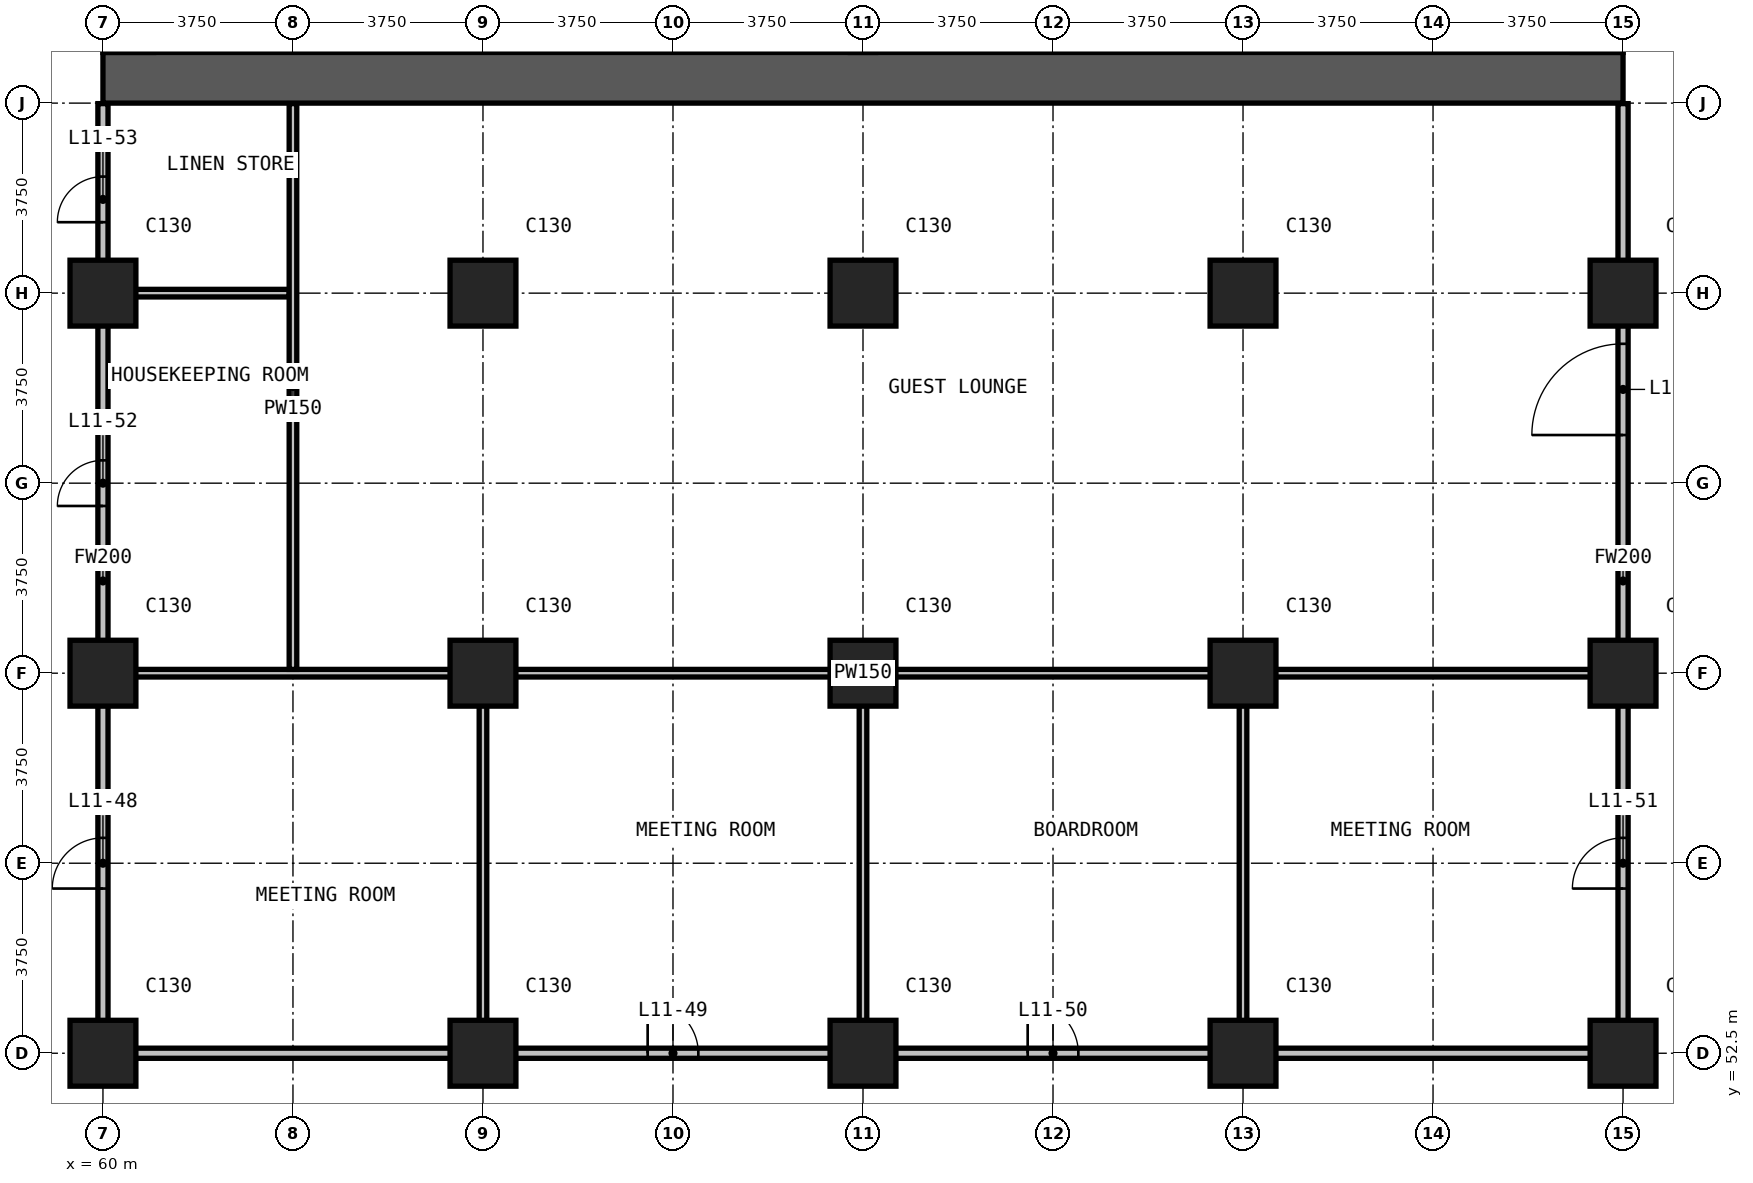
"""IFC4 building model, lengths in metres.
Left out: names, types, materials, properties, quantities, classifications, styles, units other than length and angle.
Written with IfcOpenShell. Run it as: python <this file> out.ifc"""

import sys

from ifc_helpers import new_model, si_unit, direction, frame, frame_2d, origin, origin_2d, place, context, subcontext, project, spatial, rectangle, extrude, element, fill, save


model = new_model("IFC4")
c1 = context("Model", 3, precision=1e-05, world=origin(), true_north=direction((0.0, 1.0)))
c2 = subcontext(c1, "Body", "Model", "MODEL_VIEW")
j1 = project(units=[si_unit("LENGTHUNIT", "METRE"), si_unit("PLANEANGLEUNIT", "RADIAN")], contexts=[c1])
p1 = place(None, origin())
s1 = spatial("IfcSite", under=j1, at=p1, CompositionType="ELEMENT")
p2 = place(p1, origin())
s2 = spatial("IfcBuilding", under=s1, at=p2, CompositionType="ELEMENT")
p3 = place(p2, frame((0.0, 0.0, 56.0)))
s3 = spatial("IfcBuildingStorey", under=s2, at=p3, CompositionType="ELEMENT", Elevation=56.0)
for number, where, z_axis, x_axis in (
    (1, (60.0, 52.5, 0.0), (0.0, 0.0, 1.0), (1.0, 0.0, 0.0)),
    (2, (60.0, 60.0, 0.0), (0.0, 0.0, 1.0), (1.0, 0.0, 0.0)),
    (3, (60.0, 67.5, 0.0), (0.0, 0.0, 1.0), (1.0, 0.0, 0.0)),
    (4, (67.5, 52.5, 0.0), (0.0, 0.0, 1.0), (1.0, 0.0, 0.0)),
    (5, (67.5, 60.0, 0.0), (0.0, 0.0, 1.0), (1.0, 0.0, 0.0)),
    (6, (67.5, 67.5, 0.0), (0.0, 0.0, 1.0), (1.0, 0.0, 0.0)),
    (7, (75.0, 52.5, 0.0), (0.0, 0.0, 1.0), (1.0, 0.0, 0.0)),
    (8, (75.0, 60.0, 0.0), (0.0, 0.0, 1.0), (1.0, 0.0, 0.0)),
    (9, (75.0, 67.5, 0.0), (0.0, 0.0, 1.0), (1.0, 0.0, 0.0)),
    (10, (82.5, 52.5, 0.0), (0.0, 0.0, 1.0), (1.0, 0.0, 0.0)),
    (11, (82.5, 60.0, 0.0), (0.0, 0.0, 1.0), (1.0, 0.0, 0.0)),
    (12, (82.5, 67.5, 0.0), (0.0, 0.0, 1.0), (1.0, 0.0, 0.0)),
    (13, (90.0, 52.5, 0.0), (0.0, 0.0, 1.0), (1.0, 0.0, 0.0)),
    (14, (90.0, 60.0, 0.0), (0.0, 0.0, 1.0), (1.0, 0.0, 0.0)),
    (15, (90.0, 67.5, 0.0), (0.0, 0.0, 1.0), (1.0, 0.0, 0.0)),
):
    element("IfcColumn", number, at=place(p3, frame(where, z_axis=z_axis, x_axis=x_axis)), inside=s3, PredefinedType="COLUMN", context=c2, shape_type="SweptSolid", body=[
        extrude(rectangle(XDim=1.3, YDim=1.3, at=origin_2d()), origin(), (0.0, 0.0, 1.0), 3.3),
    ])
p4 = place(p3, frame((60.0, 71.75, 0.0), z_axis=(0.0, 0.0, 1.0), x_axis=(1.0, 0.0, 0.0)))
e16 = element("IfcWall", 16, at=p4, inside=s3, PredefinedType="SHEAR", context=c2, shape_type="SweptSolid", body=[
    extrude(rectangle(XDim=30.0, YDim=1.0, at=frame_2d((15.0, 0.0))), origin(), (0.0, 0.0, 1.0), 3.3),
])
p5 = place(p3, frame((60.1, 52.5, 0.0), z_axis=(0.0, 0.0, 1.0), x_axis=(1.0, 0.0, 0.0)))
e17 = element("IfcWall", 17, at=p5, inside=s3, PredefinedType="PARTITIONING", context=c2, shape_type="SweptSolid", body=[
    extrude(rectangle(XDim=29.8, YDim=0.2, at=frame_2d((14.9, 0.0))), origin(), (0.0, 0.0, 1.0), 3.0),
])
p6 = place(p5, frame((10.65, 0.0, 0.0)))
e18 = element("IfcOpeningElement", 18, at=p6, cuts=e17, PredefinedType="OPENING", context=c2, shape_type="SweptSolid", body=[
    extrude(rectangle(XDim=1.0, YDim=2.2, at=frame_2d((0.5, 1.1))), frame((0.0, 0.11, 0.0), z_axis=(0.0, -1.0, 0.0), x_axis=(1.0, 0.0, 0.0)), (0.0, 0.0, 1.0), 0.22),
])
p7 = place(p5, frame((18.15, 0.0, 0.0)))
e19 = element("IfcOpeningElement", 19, at=p7, cuts=e17, PredefinedType="OPENING", context=c2, shape_type="SweptSolid", body=[
    extrude(rectangle(XDim=1.0, YDim=2.2, at=frame_2d((0.5, 1.1))), frame((0.0, 0.11, 0.0), z_axis=(0.0, -1.0, 0.0), x_axis=(1.0, 0.0, 0.0)), (0.0, 0.0, 1.0), 0.22),
])
p8 = place(p3, frame((60.0, 52.4, 0.0), z_axis=(0.0, 0.0, 1.0), x_axis=(0.0, 1.0, 0.0)))
e20 = element("IfcWall", 20, at=p8, inside=s3, PredefinedType="PARTITIONING", context=c2, shape_type="SweptSolid", body=[
    extrude(rectangle(XDim=18.84, YDim=0.2, at=frame_2d((9.42, 0.0))), origin(), (0.0, 0.0, 1.0), 3.0),
])
p9 = place(p8, frame((3.35, 0.0, 0.0)))
e21 = element("IfcOpeningElement", 21, at=p9, cuts=e20, PredefinedType="OPENING", context=c2, shape_type="SweptSolid", body=[
    extrude(rectangle(XDim=1.0, YDim=2.2, at=frame_2d((0.5, 1.1))), frame((0.0, 0.11, 0.0), z_axis=(0.0, -1.0, 0.0), x_axis=(1.0, 0.0, 0.0)), (0.0, 0.0, 1.0), 0.22),
])
p10 = place(p8, frame((10.9, 0.0, 0.0)))
e22 = element("IfcOpeningElement", 22, at=p10, cuts=e20, PredefinedType="OPENING", context=c2, shape_type="SweptSolid", body=[
    extrude(rectangle(XDim=0.9, YDim=2.2, at=frame_2d((0.45, 1.1))), frame((0.0, 0.11, 0.0), z_axis=(0.0, -1.0, 0.0), x_axis=(1.0, 0.0, 0.0)), (0.0, 0.0, 1.0), 0.22),
])
p11 = place(p8, frame((16.5, 0.0, 0.0)))
e23 = element("IfcOpeningElement", 23, at=p11, cuts=e20, PredefinedType="OPENING", context=c2, shape_type="SweptSolid", body=[
    extrude(rectangle(XDim=0.9, YDim=2.2, at=frame_2d((0.45, 1.1))), frame((0.0, 0.11, 0.0), z_axis=(0.0, -1.0, 0.0), x_axis=(1.0, 0.0, 0.0)), (0.0, 0.0, 1.0), 0.22),
])
p12 = place(p3, frame((90.0, 52.4, 0.0), z_axis=(0.0, 0.0, 1.0), x_axis=(0.0, 1.0, 0.0)))
e24 = element("IfcWall", 24, at=p12, inside=s3, PredefinedType="PARTITIONING", context=c2, shape_type="SweptSolid", body=[
    extrude(rectangle(XDim=18.84, YDim=0.2, at=frame_2d((9.42, 0.0))), origin(), (0.0, 0.0, 1.0), 3.0),
])
p13 = place(p12, frame((3.35, 0.0, 0.0)))
e25 = element("IfcOpeningElement", 25, at=p13, cuts=e24, PredefinedType="OPENING", context=c2, shape_type="SweptSolid", body=[
    extrude(rectangle(XDim=1.0, YDim=2.2, at=frame_2d((0.5, 1.1))), frame((0.0, 0.11, 0.0), z_axis=(0.0, -1.0, 0.0), x_axis=(1.0, 0.0, 0.0)), (0.0, 0.0, 1.0), 0.22),
])
p14 = place(p12, frame((12.3, 0.0, 0.0)))
e26 = element("IfcOpeningElement", 26, at=p14, cuts=e24, PredefinedType="OPENING", context=c2, shape_type="SweptSolid", body=[
    extrude(rectangle(XDim=1.8, YDim=2.2, at=frame_2d((0.9, 1.1))), frame((0.0, 0.11, 0.0), z_axis=(0.0, -1.0, 0.0), x_axis=(1.0, 0.0, 0.0)), (0.0, 0.0, 1.0), 0.22),
])
p15 = place(p3, frame((60.1, 60.0, 0.0), z_axis=(0.0, 0.0, 1.0), x_axis=(1.0, 0.0, 0.0)))
e27 = element("IfcWall", 27, at=p15, inside=s3, PredefinedType="PARTITIONING", context=c2, shape_type="SweptSolid", body=[
    extrude(rectangle(XDim=29.8, YDim=0.15, at=frame_2d((14.9, 0.0))), origin(), (0.0, 0.0, 1.0), 3.0),
])
p16 = place(p3, frame((60.1, 67.5, 0.0), z_axis=(0.0, 0.0, 1.0), x_axis=(1.0, 0.0, 0.0)))
e28 = element("IfcWall", 28, at=p16, inside=s3, PredefinedType="PARTITIONING", context=c2, shape_type="SweptSolid", body=[
    extrude(rectangle(XDim=3.575, YDim=0.15, at=frame_2d((1.788, 0.0))), origin(), (0.0, 0.0, 1.0), 3.0),
])
p17 = place(p3, frame((63.75, 60.075, 0.0), z_axis=(0.0, 0.0, 1.0), x_axis=(0.0, 1.0, 0.0)))
e29 = element("IfcWall", 29, at=p17, inside=s3, PredefinedType="PARTITIONING", context=c2, shape_type="SweptSolid", body=[
    extrude(rectangle(XDim=11.165, YDim=0.15, at=frame_2d((5.583, 0.0))), origin(), (0.0, 0.0, 1.0), 3.0),
])
for number, where, z_axis, x_axis in (
    (30, (67.5, 52.6, 0.0), (0.0, 0.0, 1.0), (0.0, 1.0, 0.0)),
    (31, (75.0, 52.6, 0.0), (0.0, 0.0, 1.0), (0.0, 1.0, 0.0)),
    (32, (82.5, 52.6, 0.0), (0.0, 0.0, 1.0), (0.0, 1.0, 0.0)),
):
    element("IfcWall", number, at=place(p3, frame(where, z_axis=z_axis, x_axis=x_axis)), inside=s3, PredefinedType="PARTITIONING", context=c2, shape_type="SweptSolid", body=[
        extrude(rectangle(XDim=7.325, YDim=0.15, at=frame_2d((3.663, 0.0))), origin(), (0.0, 0.0, 1.0), 3.0),
    ])
p18 = place(p9, origin())
e33 = element("IfcDoor", 33, at=p18, inside=s3, OperationType="SINGLE_SWING_RIGHT", PredefinedType="DOOR", context=c2, shape_type="SweptSolid", body=[
    extrude(rectangle(XDim=1.0, YDim=2.2, at=frame_2d((0.5, 1.1))), frame((0.0, 0.025, 0.0), z_axis=(0.0, -1.0, 0.0), x_axis=(1.0, 0.0, 0.0)), (0.0, 0.0, 1.0), 0.05),
])
fill(e21, e33)
p19 = place(p6, origin())
e34 = element("IfcDoor", 34, at=p19, inside=s3, OperationType="SINGLE_SWING_LEFT", PredefinedType="DOOR", context=c2, shape_type="SweptSolid", body=[
    extrude(rectangle(XDim=1.0, YDim=2.2, at=frame_2d((0.5, 1.1))), frame((0.0, 0.025, 0.0), z_axis=(0.0, -1.0, 0.0), x_axis=(1.0, 0.0, 0.0)), (0.0, 0.0, 1.0), 0.05),
])
fill(e18, e34)
p20 = place(p7, origin())
e35 = element("IfcDoor", 35, at=p20, inside=s3, OperationType="SINGLE_SWING_RIGHT", PredefinedType="DOOR", context=c2, shape_type="SweptSolid", body=[
    extrude(rectangle(XDim=1.0, YDim=2.2, at=frame_2d((0.5, 1.1))), frame((0.0, 0.025, 0.0), z_axis=(0.0, -1.0, 0.0), x_axis=(1.0, 0.0, 0.0)), (0.0, 0.0, 1.0), 0.05),
])
fill(e19, e35)
p21 = place(p13, origin())
e36 = element("IfcDoor", 36, at=p21, inside=s3, OperationType="SINGLE_SWING_RIGHT", PredefinedType="DOOR", context=c2, shape_type="SweptSolid", body=[
    extrude(rectangle(XDim=1.0, YDim=2.2, at=frame_2d((0.5, 1.1))), frame((0.0, 0.025, 0.0), z_axis=(0.0, -1.0, 0.0), x_axis=(1.0, 0.0, 0.0)), (0.0, 0.0, 1.0), 0.05),
])
fill(e25, e36)
p22 = place(p10, origin())
e37 = element("IfcDoor", 37, at=p22, inside=s3, OperationType="SINGLE_SWING_RIGHT", PredefinedType="DOOR", context=c2, shape_type="SweptSolid", body=[
    extrude(rectangle(XDim=0.9, YDim=2.2, at=frame_2d((0.45, 1.1))), frame((0.0, 0.025, 0.0), z_axis=(0.0, -1.0, 0.0), x_axis=(1.0, 0.0, 0.0)), (0.0, 0.0, 1.0), 0.05),
])
fill(e22, e37)
p23 = place(p11, origin())
e38 = element("IfcDoor", 38, at=p23, inside=s3, OperationType="SINGLE_SWING_RIGHT", PredefinedType="DOOR", context=c2, shape_type="SweptSolid", body=[
    extrude(rectangle(XDim=0.9, YDim=2.2, at=frame_2d((0.45, 1.1))), frame((0.0, 0.025, 0.0), z_axis=(0.0, -1.0, 0.0), x_axis=(1.0, 0.0, 0.0)), (0.0, 0.0, 1.0), 0.05),
])
fill(e23, e38)
p24 = place(p14, origin())
e39 = element("IfcDoor", 39, at=p24, inside=s3, OperationType="DOUBLE_DOOR_SINGLE_SWING", PredefinedType="DOOR", context=c2, shape_type="SweptSolid", body=[
    extrude(rectangle(XDim=1.8, YDim=2.2, at=frame_2d((0.9, 1.1))), frame((0.0, 0.025, 0.0), z_axis=(0.0, -1.0, 0.0), x_axis=(1.0, 0.0, 0.0)), (0.0, 0.0, 1.0), 0.05),
])
fill(e26, e39)
save(model, sys.argv[1])
